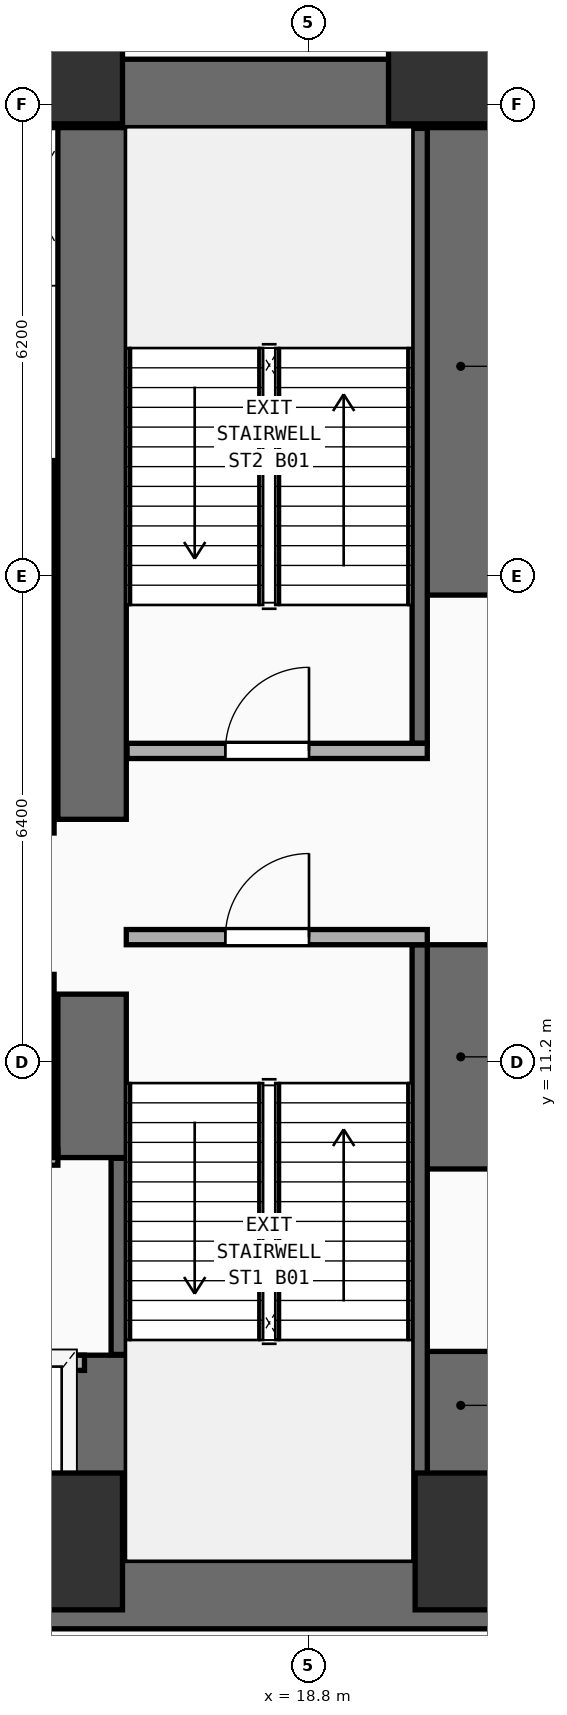
"""IFC4 building model, lengths in metres.
Left out: names, types, materials, properties, quantities, classifications, styles, units other than length and angle.
Written with IfcOpenShell. Run it as: python <this file> out.ifc"""

import sys

from ifc_helpers import new_model, si_unit, direction, frame, frame_2d, origin, origin_2d, place, context, subcontext, project, spatial, rectangle, extrude, element, fill, save


model = new_model("IFC4")
c1 = context("Model", 3, precision=1e-05, world=origin(), true_north=direction((0.0, 1.0)))
c2 = subcontext(c1, "Body", "Model", "MODEL_VIEW")
j1 = project(units=[si_unit("LENGTHUNIT", "METRE"), si_unit("PLANEANGLEUNIT", "RADIAN")], contexts=[c1])
p1 = place(None, origin())
s1 = spatial("IfcSite", under=j1, at=p1, CompositionType="ELEMENT")
p2 = place(p1, origin())
s2 = spatial("IfcBuilding", under=s1, at=p2, CompositionType="ELEMENT")
p3 = place(p2, frame((0.0, 0.0, -4.2)))
s3 = spatial("IfcBuildingStorey", under=s2, at=p3, CompositionType="ELEMENT", Elevation=-4.2)
for number, where, z_axis, x_axis in (
    (1, (7.0, 4.2, 0.0), (0.0, 0.0, 1.0), (1.0, 0.0, 0.0)),
    (2, (7.0, 23.95, 0.0), (0.0, 0.0, 1.0), (1.0, 0.0, 0.0)),
):
    element("IfcWall", number, at=place(p3, frame(where, z_axis=z_axis, x_axis=x_axis)), inside=s3, PredefinedType="SHEAR", context=c2, shape_type="SweptSolid", body=[
        extrude(rectangle(XDim=14.25, YDim=0.9, at=frame_2d((7.125, 0.0))), origin(), (0.0, 0.0, 1.0), 3.82),
    ])
p4 = place(p3, frame((20.8, 4.65, 0.0), z_axis=(0.0, 0.0, 1.0), x_axis=(0.0, 1.0, 0.0)))
e3 = element("IfcWall", 3, at=p4, inside=s3, PredefinedType="SHEAR", context=c2, shape_type="SweptSolid", body=[
    extrude(rectangle(XDim=2.75, YDim=0.9, at=frame_2d((1.375, 0.0))), origin(), (0.0, 0.0, 1.0), 3.82),
])
p5 = place(p3, frame((20.8, 9.8, 0.0), z_axis=(0.0, 0.0, 1.0), x_axis=(0.0, 1.0, 0.0)))
e4 = element("IfcWall", 4, at=p5, inside=s3, PredefinedType="SHEAR", context=c2, shape_type="SweptSolid", body=[
    extrude(rectangle(XDim=2.95, YDim=0.9, at=frame_2d((1.475, 0.0))), origin(), (0.0, 0.0, 1.0), 3.82),
])
p6 = place(p3, frame((20.8, 17.35, 0.0), z_axis=(0.0, 0.0, 1.0), x_axis=(0.0, 1.0, 0.0)))
e5 = element("IfcWall", 5, at=p6, inside=s3, PredefinedType="SHEAR", context=c2, shape_type="SweptSolid", body=[
    extrude(rectangle(XDim=6.15, YDim=0.9, at=frame_2d((3.075, 0.0))), origin(), (0.0, 0.0, 1.0), 3.82),
])
p7 = place(p3, frame((15.95, 4.65, 0.0), z_axis=(0.0, 0.0, 1.0), x_axis=(0.0, 1.0, 0.0)))
e6 = element("IfcWall", 6, at=p7, inside=s3, PredefinedType="SHEAR", context=c2, shape_type="SweptSolid", body=[
    extrude(rectangle(XDim=2.7, YDim=0.9, at=frame_2d((1.35, 0.0))), origin(), (0.0, 0.0, 1.0), 3.82),
])
p8 = place(p3, frame((15.95, 9.95, 0.0), z_axis=(0.0, 0.0, 1.0), x_axis=(0.0, 1.0, 0.0)))
e7 = element("IfcWall", 7, at=p8, inside=s3, PredefinedType="SHEAR", context=c2, shape_type="SweptSolid", body=[
    extrude(rectangle(XDim=2.15, YDim=0.9, at=frame_2d((1.075, 0.0))), origin(), (0.0, 0.0, 1.0), 3.82),
])
p9 = place(p3, frame((15.95, 14.4, 0.0), z_axis=(0.0, 0.0, 1.0), x_axis=(0.0, 1.0, 0.0)))
e8 = element("IfcWall", 8, at=p9, inside=s3, PredefinedType="SHEAR", context=c2, shape_type="SweptSolid", body=[
    extrude(rectangle(XDim=9.1, YDim=0.9, at=frame_2d((4.55, 0.0))), origin(), (0.0, 0.0, 1.0), 3.82),
])
for number, where, z_axis, x_axis in (
    (9, (15.45, 4.9, 0.0), (0.0, 0.0, 1.0), (1.0, 0.0, 0.0)),
    (10, (21.1, 4.9, 0.0), (0.0, 0.0, 1.0), (1.0, 0.0, 0.0)),
    (11, (15.45, 24.45, 0.0), (0.0, 0.0, 1.0), (1.0, 0.0, 0.0)),
    (12, (20.75, 24.45, 0.0), (0.0, 0.0, 1.0), (1.0, 0.0, 0.0)),
):
    element("IfcColumn", number, at=place(p3, frame(where, z_axis=z_axis, x_axis=x_axis)), inside=s3, PredefinedType="COLUMN", context=c2, shape_type="SweptSolid", body=[
        extrude(rectangle(XDim=1.8, YDim=1.8, at=origin_2d()), origin(), (0.0, 0.0, 1.0), 3.82),
    ])
p10 = place(p3, frame((16.3, 7.36, 0.0), z_axis=(0.0, 0.0, 1.0), x_axis=(0.0, 1.0, 0.0)))
e13 = element("IfcWall", 13, at=p10, inside=s3, PredefinedType="SHEAR", context=c2, shape_type="SweptSolid", body=[
    extrude(rectangle(XDim=2.58, YDim=0.2, at=frame_2d((1.29, 0.0))), origin(), (0.0, 0.0, 1.0), 3.82),
])
p11 = place(p3, frame((20.26, 4.66, 0.0), z_axis=(0.0, 0.0, 1.0), x_axis=(0.0, 1.0, 0.0)))
e14 = element("IfcWall", 14, at=p11, inside=s3, PredefinedType="SHEAR", context=c2, shape_type="SweptSolid", body=[
    extrude(rectangle(XDim=8.09, YDim=0.2, at=frame_2d((4.045, 0.0))), origin(), (0.0, 0.0, 1.0), 3.82),
])
p12 = place(p3, frame((16.4, 12.85, 0.0), z_axis=(0.0, 0.0, 1.0), x_axis=(1.0, 0.0, 0.0)))
e15 = element("IfcWall", 15, at=p12, inside=s3, PredefinedType="PARTITIONING", context=c2, shape_type="SweptSolid", body=[
    extrude(rectangle(XDim=3.96, YDim=0.2, at=frame_2d((1.98, 0.0))), origin(), (0.0, 0.0, 1.0), 3.82),
])
p13 = place(p12, frame((1.304, 0.0, 0.0)))
e16 = element("IfcOpeningElement", 16, at=p13, cuts=e15, PredefinedType="OPENING", context=c2, shape_type="SweptSolid", body=[
    extrude(rectangle(XDim=1.1, YDim=2.2, at=frame_2d((0.55, 1.1))), frame((0.0, 0.11, 0.0), z_axis=(0.0, -1.0, 0.0), x_axis=(1.0, 0.0, 0.0)), (0.0, 0.0, 1.0), 0.22),
])
p14 = place(p3, frame((20.26, 15.4, 0.0), z_axis=(0.0, 0.0, 1.0), x_axis=(0.0, 1.0, 0.0)))
e17 = element("IfcWall", 17, at=p14, inside=s3, PredefinedType="SHEAR", context=c2, shape_type="SweptSolid", body=[
    extrude(rectangle(XDim=8.09, YDim=0.2, at=frame_2d((4.045, 0.0))), origin(), (0.0, 0.0, 1.0), 3.82),
])
p15 = place(p3, frame((16.41, 15.3, 0.0), z_axis=(0.0, 0.0, 1.0), x_axis=(1.0, 0.0, 0.0)))
e18 = element("IfcWall", 18, at=p15, inside=s3, PredefinedType="PARTITIONING", context=c2, shape_type="SweptSolid", body=[
    extrude(rectangle(XDim=3.95, YDim=0.2, at=frame_2d((1.975, 0.0))), origin(), (0.0, 0.0, 1.0), 3.82),
])
p16 = place(p15, frame((1.294, 0.0, 0.0)))
e19 = element("IfcOpeningElement", 19, at=p16, cuts=e18, PredefinedType="OPENING", context=c2, shape_type="SweptSolid", body=[
    extrude(rectangle(XDim=1.1, YDim=2.2, at=frame_2d((0.55, 1.1))), frame((0.0, 0.11, 0.0), z_axis=(0.0, -1.0, 0.0), x_axis=(1.0, 0.0, 0.0)), (0.0, 0.0, 1.0), 0.22),
])
p17 = place(p3, frame((7.5, 7.25, 0.0), z_axis=(0.0, 0.0, 1.0), x_axis=(1.0, 0.0, 0.0)))
e20 = element("IfcWall", 20, at=p17, inside=s3, PredefinedType="PARTITIONING", context=c2, shape_type="SweptSolid", body=[
    extrude(rectangle(XDim=8.35, YDim=0.2, at=frame_2d((4.175, 0.0))), origin(), (0.0, 0.0, 1.0), 3.82),
])
p18 = place(p17, frame((0.53, 0.0, 0.0)))
e21 = element("IfcOpeningElement", 21, at=p18, cuts=e20, PredefinedType="OPENING", context=c2, shape_type="SweptSolid", body=[
    extrude(rectangle(XDim=1.1, YDim=2.2, at=frame_2d((0.55, 1.1))), frame((0.0, 0.11, 0.0), z_axis=(0.0, -1.0, 0.0), x_axis=(1.0, 0.0, 0.0)), (0.0, 0.0, 1.0), 0.22),
])
p19 = place(p17, frame((2.37, 0.0, 0.0)))
e22 = element("IfcOpeningElement", 22, at=p19, cuts=e20, PredefinedType="OPENING", context=c2, shape_type="SweptSolid", body=[
    extrude(rectangle(XDim=1.1, YDim=2.2, at=frame_2d((0.55, 1.1))), frame((0.0, 0.11, 0.0), z_axis=(0.0, -1.0, 0.0), x_axis=(1.0, 0.0, 0.0)), (0.0, 0.0, 1.0), 0.22),
])
p20 = place(p17, frame((4.33, 0.0, 0.0)))
e23 = element("IfcOpeningElement", 23, at=p20, cuts=e20, PredefinedType="OPENING", context=c2, shape_type="SweptSolid", body=[
    extrude(rectangle(XDim=1.1, YDim=2.2, at=frame_2d((0.55, 1.1))), frame((0.0, 0.11, 0.0), z_axis=(0.0, -1.0, 0.0), x_axis=(1.0, 0.0, 0.0)), (0.0, 0.0, 1.0), 0.22),
])
p21 = place(p17, frame((6.5, 0.0, 0.0)))
e24 = element("IfcOpeningElement", 24, at=p21, cuts=e20, PredefinedType="OPENING", context=c2, shape_type="SweptSolid", body=[
    extrude(rectangle(XDim=1.1, YDim=2.2, at=frame_2d((0.55, 1.1))), frame((0.0, 0.11, 0.0), z_axis=(0.0, -1.0, 0.0), x_axis=(1.0, 0.0, 0.0)), (0.0, 0.0, 1.0), 0.22),
])
p22 = place(p3, frame((7.9, 9.95, 0.0), z_axis=(0.0, 0.0, 1.0), x_axis=(1.0, 0.0, 0.0)))
e25 = element("IfcWall", 25, at=p22, inside=s3, PredefinedType="PARTITIONING", context=c2, shape_type="SweptSolid", body=[
    extrude(rectangle(XDim=7.6, YDim=0.2, at=frame_2d((3.8, 0.0))), origin(), (0.0, 0.0, 1.0), 3.82),
])
p23 = place(p3, frame((15.35, 9.95, 0.0), z_axis=(0.0, 0.0, 1.0), x_axis=(0.0, 1.0, 0.0)))
e26 = element("IfcWall", 26, at=p23, inside=s3, PredefinedType="PARTITIONING", context=c2, shape_type="SweptSolid", body=[
    extrude(rectangle(XDim=2.41, YDim=0.2, at=frame_2d((1.205, 0.0))), origin(), (0.0, 0.0, 1.0), 3.82),
])
p24 = place(p3, frame((15.35, 14.22, 0.0), z_axis=(0.0, 0.0, 1.0), x_axis=(0.0, 1.0, 0.0)))
e27 = element("IfcWall", 27, at=p24, inside=s3, PredefinedType="PARTITIONING", context=c2, shape_type="SweptSolid", body=[
    extrude(rectangle(XDim=2.23, YDim=0.2, at=frame_2d((1.115, 0.0))), origin(), (0.0, 0.0, 1.0), 3.82),
])
p25 = place(p3, frame((15.35, 16.45, 0.0), z_axis=(0.0, 0.0, 1.0), x_axis=(0.0, 1.0, 0.0)))
e28 = element("IfcWall", 28, at=p25, inside=s3, PredefinedType="PARTITIONING", context=c2, shape_type="SweptSolid", body=[
    extrude(rectangle(XDim=2.67, YDim=0.2, at=frame_2d((1.335, 0.0))), origin(), (0.0, 0.0, 1.0), 3.82),
])
p26 = place(p13, frame((1.1, 0.0, 0.0), z_axis=(0.0, 0.0, 1.0), x_axis=(-1.0, 0.0, 0.0)))
e29 = element("IfcDoor", 29, at=p26, inside=s3, OperationType="SINGLE_SWING_LEFT", PredefinedType="DOOR", context=c2, shape_type="SweptSolid", body=[
    extrude(rectangle(XDim=1.1, YDim=2.2, at=frame_2d((0.55, 1.1))), frame((0.0, 0.025, 0.0), z_axis=(0.0, -1.0, 0.0), x_axis=(1.0, 0.0, 0.0)), (0.0, 0.0, 1.0), 0.05),
])
fill(e16, e29)
p27 = place(p16, origin())
e30 = element("IfcDoor", 30, at=p27, inside=s3, OperationType="SINGLE_SWING_RIGHT", PredefinedType="DOOR", context=c2, shape_type="SweptSolid", body=[
    extrude(rectangle(XDim=1.1, YDim=2.2, at=frame_2d((0.55, 1.1))), frame((0.0, 0.025, 0.0), z_axis=(0.0, -1.0, 0.0), x_axis=(1.0, 0.0, 0.0)), (0.0, 0.0, 1.0), 0.05),
])
fill(e19, e30)
save(model, sys.argv[1])
